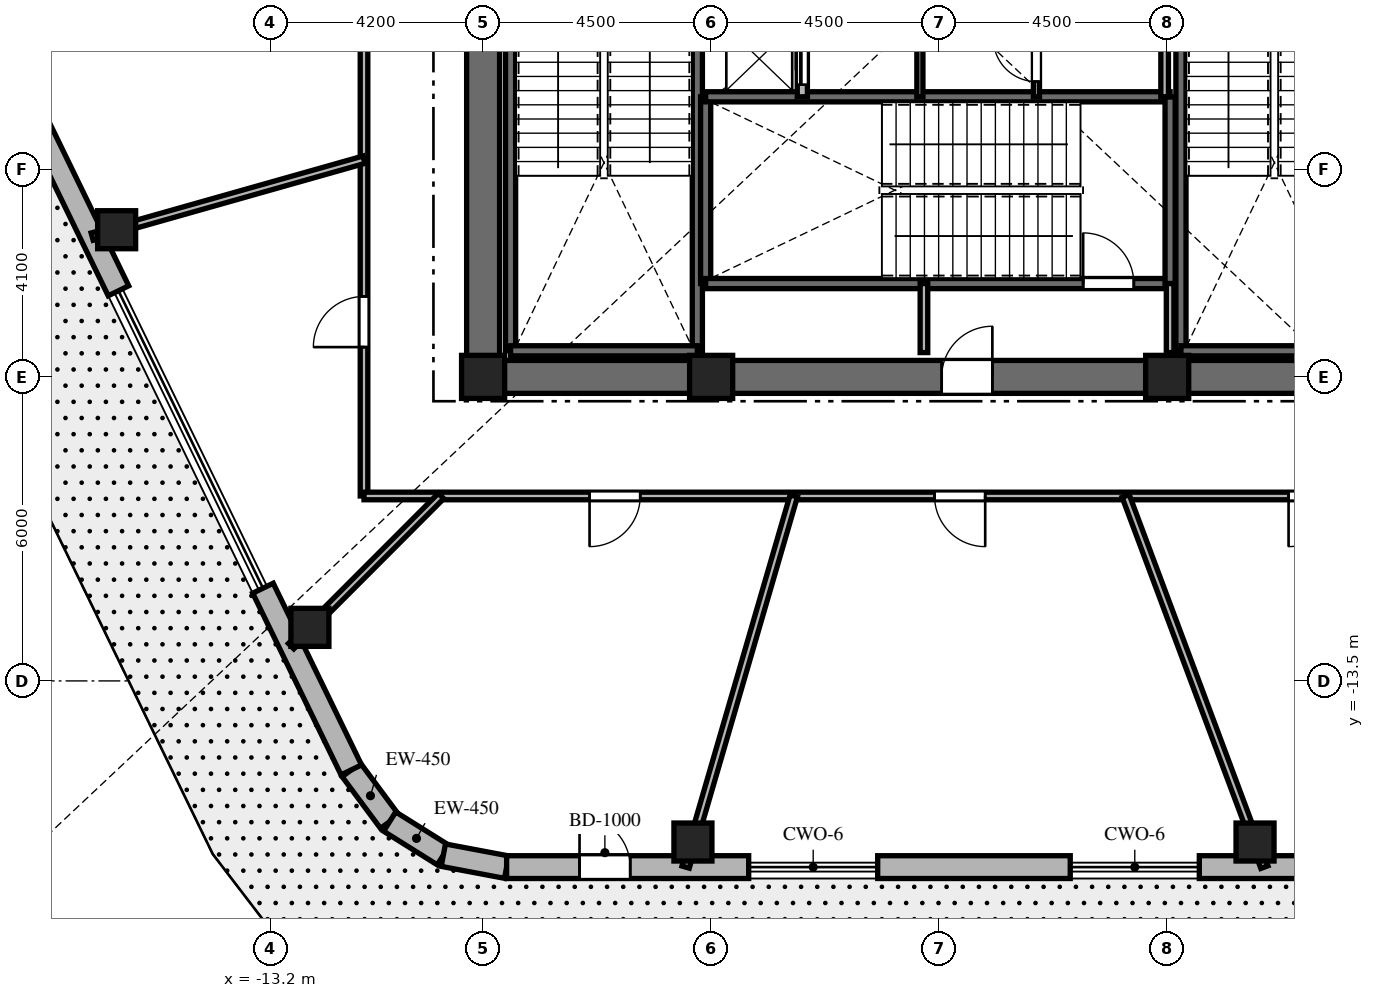
"""IFC4 building model, lengths in metres.
Left out: names, types, materials, properties, quantities, classifications, styles, units other than length and angle.
Written with IfcOpenShell. Run it as: python <this file> out.ifc"""

import sys

from ifc_helpers import new_model, si_unit, direction, frame, frame_2d, origin, origin_2d, place, context, subcontext, project, spatial, rectangle, extrude, element, fill, save


model = new_model("IFC4")
c1 = context("Model", 3, precision=1e-05, world=origin(), true_north=direction((0.0, 1.0)))
c2 = subcontext(c1, "Body", "Model", "MODEL_VIEW")
j1 = project(units=[si_unit("LENGTHUNIT", "METRE"), si_unit("PLANEANGLEUNIT", "RADIAN")], contexts=[c1])
p1 = place(None, origin())
s1 = spatial("IfcSite", under=j1, at=p1, CompositionType="ELEMENT")
p2 = place(p1, origin())
s2 = spatial("IfcBuilding", under=s1, at=p2, CompositionType="ELEMENT")
p3 = place(p2, frame((0.0, 0.0, 305.4)))
s3 = spatial("IfcBuildingStorey", under=s2, at=p3, CompositionType="ELEMENT", Elevation=305.4)
p4 = place(p3, frame((-9.325, -7.5, 0.0), z_axis=(0.0, 0.0, 1.0), x_axis=(1.0, 0.0, 0.0)))
e1 = element("IfcWall", 1, at=p4, inside=s3, PredefinedType="SHEAR", context=c2, shape_type="SweptSolid", body=[
    extrude(rectangle(XDim=18.65, YDim=0.65, at=frame_2d((9.325, 0.0))), origin(), (0.0, 0.0, 1.0), 5.0),
])
p5 = place(p4, frame((9.375, 0.0, 0.0)))
e2 = element("IfcOpeningElement", 2, at=p5, cuts=e1, PredefinedType="OPENING", context=c2, shape_type="SweptSolid", body=[
    extrude(rectangle(XDim=1.0, YDim=2.15, at=frame_2d((0.5, 1.075))), frame((0.0, 0.335, 0.0), z_axis=(0.0, -1.0, 0.0), x_axis=(1.0, 0.0, 0.0)), (0.0, 0.0, 1.0), 0.67),
])
p6 = place(p3, frame((-9.0, -7.175, 0.0), z_axis=(0.0, 0.0, 1.0), x_axis=(0.0, 1.0, 0.0)))
e3 = element("IfcWall", 3, at=p6, inside=s3, PredefinedType="SHEAR", context=c2, shape_type="SweptSolid", body=[
    extrude(rectangle(XDim=14.35, YDim=0.65, at=frame_2d((7.175, 0.0))), origin(), (0.0, 0.0, 1.0), 5.0),
])
p7 = place(p6, frame((10.3, 0.0, 0.0)))
e4 = element("IfcOpeningElement", 4, at=p7, cuts=e3, PredefinedType="OPENING", context=c2, shape_type="SweptSolid", body=[
    extrude(rectangle(XDim=1.05, YDim=2.15, at=frame_2d((0.525, 1.075))), frame((0.0, 0.335, 0.0), z_axis=(0.0, -1.0, 0.0), x_axis=(1.0, 0.0, 0.0)), (0.0, 0.0, 1.0), 0.67),
])
for number, where, z_axis, x_axis in (
    (5, (-8.458, -6.985, 0.0), (0.0, 0.0, 1.0), (0.0, 1.0, 0.0)),
    (6, (-4.772, -6.985, 0.0), (0.0, 0.0, 1.0), (0.0, 1.0, 0.0)),
):
    element("IfcWall", number, at=place(p3, frame(where, z_axis=z_axis, x_axis=x_axis)), inside=s3, PredefinedType="SHEAR", context=c2, shape_type="SweptSolid", body=[
        extrude(rectangle(XDim=9.143, YDim=0.2, at=frame_2d((4.572, 0.0))), origin(), (0.0, 0.0, 1.0), 5.0),
    ])
p8 = place(p3, frame((-8.458, -6.985, 0.0), z_axis=(0.0, 0.0, 1.0), x_axis=(1.0, 0.0, 0.0)))
e7 = element("IfcWall", 7, at=p8, inside=s3, PredefinedType="SHEAR", context=c2, shape_type="SweptSolid", body=[
    extrude(rectangle(XDim=3.686, YDim=0.2, at=frame_2d((1.843, 0.0))), origin(), (0.0, 0.0, 1.0), 5.0),
])
p9 = place(p3, frame((4.772, -6.985, 0.0), z_axis=(0.0, 0.0, 1.0), x_axis=(0.0, 1.0, 0.0)))
e8 = element("IfcWall", 8, at=p9, inside=s3, PredefinedType="SHEAR", context=c2, shape_type="SweptSolid", body=[
    extrude(rectangle(XDim=9.143, YDim=0.2, at=frame_2d((4.572, 0.0))), origin(), (0.0, 0.0, 1.0), 5.0),
])
for number, where, z_axis, x_axis in (
    (9, (4.772, -6.985, 0.0), (0.0, 0.0, 1.0), (1.0, 0.0, 0.0)),
    (10, (-4.608, -5.658, 0.0), (0.0, 0.0, 1.0), (0.0, 1.0, 0.0)),
):
    element("IfcWall", number, at=place(p3, frame(where, z_axis=z_axis, x_axis=x_axis)), inside=s3, PredefinedType="SHEAR", context=c2, shape_type="SweptSolid", body=[
        extrude(rectangle(XDim=3.686, YDim=0.2, at=frame_2d((1.843, 0.0))), origin(), (0.0, 0.0, 1.0), 5.0),
    ])
p10 = place(p3, frame((-4.608, -5.658, 0.0), z_axis=(0.0, 0.0, 1.0), x_axis=(1.0, 0.0, 0.0)))
e11 = element("IfcWall", 11, at=p10, inside=s3, PredefinedType="SHEAR", context=c2, shape_type="SweptSolid", body=[
    extrude(rectangle(XDim=9.166, YDim=0.2, at=frame_2d((4.583, 0.0))), origin(), (0.0, 0.0, 1.0), 5.0),
])
p11 = place(p10, frame((7.45, 0.0, 0.0)))
e12 = element("IfcOpeningElement", 12, at=p11, cuts=e11, PredefinedType="OPENING", context=c2, shape_type="SweptSolid", body=[
    extrude(rectangle(XDim=1.0, YDim=2.15, at=frame_2d((0.5, 1.075))), frame((0.0, 0.11, 0.0), z_axis=(0.0, -1.0, 0.0), x_axis=(1.0, 0.0, 0.0)), (0.0, 0.0, 1.0), 0.22),
])
p12 = place(p3, frame((-4.608, -1.972, 0.0), z_axis=(0.0, 0.0, 1.0), x_axis=(1.0, 0.0, 0.0)))
e13 = element("IfcWall", 13, at=p12, inside=s3, PredefinedType="SHEAR", context=c2, shape_type="SweptSolid", body=[
    extrude(rectangle(XDim=9.166, YDim=0.2, at=frame_2d((4.583, 0.0))), origin(), (0.0, 0.0, 1.0), 5.0),
])
p13 = place(p3, frame((4.558, -5.658, 0.0), z_axis=(0.0, 0.0, 1.0), x_axis=(0.0, 1.0, 0.0)))
e14 = element("IfcWall", 14, at=p13, inside=s3, PredefinedType="SHEAR", context=c2, shape_type="SweptSolid", body=[
    extrude(rectangle(XDim=3.686, YDim=0.2, at=frame_2d((1.843, 0.0))), origin(), (0.0, 0.0, 1.0), 5.0),
])
for number, where, z_axis, x_axis in (
    (15, (-9.0, -7.5, 0.0), (0.0, 0.0, 1.0), (1.0, 0.0, 0.0)),
    (16, (-4.5, -7.5, 0.0), (0.0, 0.0, 1.0), (1.0, 0.0, 0.0)),
    (17, (4.5, -7.5, 0.0), (0.0, 0.0, 1.0), (1.0, 0.0, 0.0)),
):
    element("IfcColumn", number, at=place(p3, frame(where, z_axis=z_axis, x_axis=x_axis)), inside=s3, PredefinedType="COLUMN", context=c2, shape_type="SweptSolid", body=[
        extrude(rectangle(XDim=0.85, YDim=0.85, at=origin_2d()), origin(), (0.0, 0.0, 1.0), 5.0),
    ])
for number, where, z_axis, x_axis in (
    (18, (-4.859, -16.68, 0.0), (0.0, 0.0, 1.0), (1.0, 0.0, 0.0)),
    (19, (6.234, -16.68, 0.0), (0.0, 0.0, 1.0), (1.0, 0.0, 0.0)),
    (20, (-16.232, -4.595, 0.0), (0.0, 0.0, 1.0), (1.0, 0.0, 0.0)),
    (21, (-12.418, -12.443, 0.0), (0.0, 0.0, 1.0), (1.0, 0.0, 0.0)),
):
    element("IfcColumn", number, at=place(p3, frame(where, z_axis=z_axis, x_axis=x_axis)), inside=s3, PredefinedType="COLUMN", context=c2, shape_type="SweptSolid", body=[
        extrude(rectangle(XDim=0.75, YDim=0.75, at=origin_2d()), origin(), (0.0, 0.0, 1.0), 5.0),
    ])
p14 = place(p3, frame((-11.602, -15.256, 0.0), z_axis=(0.0, 0.0, 1.0), x_axis=(0.596058719353, -0.802940846566, 0.0)))
e22 = element("IfcWall", 22, at=p14, inside=s3, PredefinedType="SOLIDWALL", context=c2, shape_type="SweptSolid", body=[
    extrude(rectangle(XDim=1.271, YDim=0.45, at=frame_2d((0.635, 0.0))), origin(), (0.0, 0.0, 1.0), 4.68),
])
p15 = place(p3, frame((-10.844, -16.277, 0.0), z_axis=(0.0, 0.0, 1.0), x_axis=(0.847723789959, -0.530437909597, 0.0)))
e23 = element("IfcWall", 23, at=p15, inside=s3, PredefinedType="SOLIDWALL", context=c2, shape_type="SweptSolid", body=[
    extrude(rectangle(XDim=1.25, YDim=0.45, at=frame_2d((0.625, 0.0))), origin(), (0.0, 0.0, 1.0), 4.68),
])
p16 = place(p3, frame((-9.785, -16.939, 0.0), z_axis=(0.0, 0.0, 1.0), x_axis=(0.982664955661, -0.185390358204, 0.0)))
e24 = element("IfcWall", 24, at=p16, inside=s3, PredefinedType="SOLIDWALL", context=c2, shape_type="SweptSolid", body=[
    extrude(rectangle(XDim=1.271, YDim=0.45, at=frame_2d((0.635, 0.0))), origin(), (0.0, 0.0, 1.0), 4.68),
])
p17 = place(p3, frame((-8.536, -17.175, 0.0), z_axis=(0.0, 0.0, 1.0), x_axis=(1.0, 0.0, 0.0)))
e25 = element("IfcWall", 25, at=p17, inside=s3, PredefinedType="SOLIDWALL", context=c2, shape_type="SweptSolid", body=[
    extrude(rectangle(XDim=4.777, YDim=0.45, at=frame_2d((2.389, 0.0))), origin(), (0.0, 0.0, 1.0), 4.68),
])
p18 = place(p17, frame((1.439, 0.0, 0.0)))
e26 = element("IfcOpeningElement", 26, at=p18, cuts=e25, PredefinedType="OPENING", context=c2, shape_type="SweptSolid", body=[
    extrude(rectangle(XDim=1.0, YDim=2.15, at=frame_2d((0.5, 1.075))), frame((0.0, 0.235, 0.0), z_axis=(0.0, -1.0, 0.0), x_axis=(1.0, 0.0, 0.0)), (0.0, 0.0, 1.0), 0.47),
])
p19 = place(p3, frame((-1.213, -17.175, 0.0), z_axis=(0.0, 0.0, 1.0), x_axis=(1.0, 0.0, 0.0)))
e27 = element("IfcWall", 27, at=p19, inside=s3, PredefinedType="SOLIDWALL", context=c2, shape_type="SweptSolid", body=[
    extrude(rectangle(XDim=3.8, YDim=0.45, at=frame_2d((1.9, 0.0))), origin(), (0.0, 0.0, 1.0), 4.68),
])
p20 = place(p3, frame((5.134, -17.175, 0.0), z_axis=(0.0, 0.0, 1.0), x_axis=(1.0, 0.0, 0.0)))
e28 = element("IfcWall", 28, at=p20, inside=s3, PredefinedType="SOLIDWALL", context=c2, shape_type="SweptSolid", body=[
    extrude(rectangle(XDim=4.773, YDim=0.45, at=frame_2d((2.387, 0.0))), origin(), (0.0, 0.0, 1.0), 4.68),
])
p21 = place(p3, frame((-17.942, -2.208, 0.0), z_axis=(0.0, 0.0, 1.0), x_axis=(0.437062225544, -0.899431270861, 0.0)))
e29 = element("IfcWall", 29, at=p21, inside=s3, PredefinedType="SOLIDWALL", context=c2, shape_type="SweptSolid", body=[
    extrude(rectangle(XDim=3.994, YDim=0.45, at=frame_2d((1.997, 0.0))), origin(), (0.0, 0.0, 1.0), 4.68),
])
p22 = place(p3, frame((-13.344, -11.67, 0.0), z_axis=(0.0, 0.0, 1.0), x_axis=(0.437044105444, -0.899440075768, 0.0)))
e30 = element("IfcWall", 30, at=p22, inside=s3, PredefinedType="SOLIDWALL", context=c2, shape_type="SweptSolid", body=[
    extrude(rectangle(XDim=3.987, YDim=0.45, at=frame_2d((1.993, 0.0))), origin(), (0.0, 0.0, 1.0), 4.68),
])
for number, where, z_axis, x_axis in (
    (31, (-0.3, -7.02, 0.0), (0.0, 0.0, 1.0), (0.0, 1.0, 0.0)),
    (32, (4.558, -7.02, 0.0), (0.0, 0.0, 1.0), (0.0, 1.0, 0.0)),
):
    element("IfcWall", number, at=place(p3, frame(where, z_axis=z_axis, x_axis=x_axis)), inside=s3, PredefinedType="PARTITIONING", context=c2, shape_type="SweptSolid", body=[
        extrude(rectangle(XDim=1.362, YDim=0.15, at=frame_2d((0.681, 0.0))), origin(), (0.0, 0.0, 1.0), 4.68),
    ])
p23 = place(p3, frame((-2.7, -1.972, 0.0), z_axis=(0.0, 0.0, 1.0), x_axis=(0.0, 1.0, 0.0)))
e33 = element("IfcWall", 33, at=p23, inside=s3, PredefinedType="PARTITIONING", context=c2, shape_type="SweptSolid", body=[
    extrude(rectangle(XDim=1.472, YDim=0.2, at=frame_2d((0.736, 0.0))), origin(), (0.0, 0.0, 1.0), 4.68),
])
p24 = place(p23, frame((0.24, 0.0, 0.0)))
e34 = element("IfcOpeningElement", 34, at=p24, cuts=e33, PredefinedType="OPENING", context=c2, shape_type="SweptSolid", body=[
    extrude(rectangle(XDim=1.0, YDim=2.2, at=frame_2d((0.5, 1.1))), frame((0.0, 0.11, 0.0), z_axis=(0.0, -1.0, 0.0), x_axis=(1.0, 0.0, 0.0)), (0.0, 0.0, 1.0), 0.22),
])
p25 = place(p3, frame((4.45, -1.972, 0.0), z_axis=(0.0, 0.0, 1.0), x_axis=(0.0, 1.0, 0.0)))
e35 = element("IfcWall", 35, at=p25, inside=s3, PredefinedType="PARTITIONING", context=c2, shape_type="SweptSolid", body=[
    extrude(rectangle(XDim=4.222, YDim=0.15, at=frame_2d((2.111, 0.0))), origin(), (0.0, 0.0, 1.0), 4.68),
])
p26 = place(p3, frame((-0.38, -1.972, 0.0), z_axis=(0.0, 0.0, 1.0), x_axis=(0.0, 1.0, 0.0)))
e36 = element("IfcWall", 36, at=p26, inside=s3, PredefinedType="PARTITIONING", context=c2, shape_type="SweptSolid", body=[
    extrude(rectangle(XDim=1.472, YDim=0.12, at=frame_2d((0.736, 0.0))), origin(), (0.0, 0.0, 1.0), 4.68),
])
p27 = place(p3, frame((1.92, -1.972, 0.0), z_axis=(0.0, 0.0, 1.0), x_axis=(0.0, 1.0, 0.0)))
e37 = element("IfcWall", 37, at=p27, inside=s3, PredefinedType="PARTITIONING", context=c2, shape_type="SweptSolid", body=[
    extrude(rectangle(XDim=1.472, YDim=0.12, at=frame_2d((0.736, 0.0))), origin(), (0.0, 0.0, 1.0), 4.68),
])
p28 = place(p27, frame((0.3, 0.0, 0.0)))
e38 = element("IfcOpeningElement", 38, at=p28, cuts=e37, PredefinedType="OPENING", context=c2, shape_type="SweptSolid", body=[
    extrude(rectangle(XDim=0.85, YDim=2.03, at=frame_2d((0.425, 1.015))), frame((0.0, 0.07, 0.0), z_axis=(0.0, -1.0, 0.0), x_axis=(1.0, 0.0, 0.0)), (0.0, 0.0, 1.0), 0.14),
])
p29 = place(p3, frame((-11.35, -9.85, 0.0), z_axis=(0.0, 0.0, 1.0), x_axis=(0.0, 1.0, 0.0)))
e39 = element("IfcWall", 39, at=p29, inside=s3, PredefinedType="PARTITIONING", context=c2, shape_type="SweptSolid", body=[
    extrude(rectangle(XDim=19.7, YDim=0.15, at=frame_2d((9.85, 0.0))), origin(), (0.0, 0.0, 1.0), 2.87),
])
p30 = place(p29, frame((15.219, 0.0, 0.0)))
e40 = element("IfcOpeningElement", 40, at=p30, cuts=e39, PredefinedType="OPENING", context=c2, shape_type="SweptSolid", body=[
    extrude(rectangle(XDim=1.0, YDim=2.03, at=frame_2d((0.5, 1.015))), frame((0.0, 0.085, 0.0), z_axis=(0.0, -1.0, 0.0), x_axis=(1.0, 0.0, 0.0)), (0.0, 0.0, 1.0), 0.17),
])
p31 = place(p29, frame((8.805, 0.0, 0.0)))
e41 = element("IfcOpeningElement", 41, at=p31, cuts=e39, PredefinedType="OPENING", context=c2, shape_type="SweptSolid", body=[
    extrude(rectangle(XDim=1.0, YDim=2.03, at=frame_2d((0.5, 1.015))), frame((0.0, 0.085, 0.0), z_axis=(0.0, -1.0, 0.0), x_axis=(1.0, 0.0, 0.0)), (0.0, 0.0, 1.0), 0.17),
])
p32 = place(p29, frame((2.938, 0.0, 0.0)))
e42 = element("IfcOpeningElement", 42, at=p32, cuts=e39, PredefinedType="OPENING", context=c2, shape_type="SweptSolid", body=[
    extrude(rectangle(XDim=1.0, YDim=2.03, at=frame_2d((0.5, 1.015))), frame((0.0, 0.085, 0.0), z_axis=(0.0, -1.0, 0.0), x_axis=(1.0, 0.0, 0.0)), (0.0, 0.0, 1.0), 0.17),
])
p33 = place(p3, frame((11.35, -9.85, 0.0), z_axis=(0.0, 0.0, 1.0), x_axis=(-1.0, 0.0, 0.0)))
e43 = element("IfcWall", 43, at=p33, inside=s3, PredefinedType="PARTITIONING", context=c2, shape_type="SweptSolid", body=[
    extrude(rectangle(XDim=22.7, YDim=0.15, at=frame_2d((11.35, 0.0))), origin(), (0.0, 0.0, 1.0), 2.87),
])
p34 = place(p33, frame((17.249, 0.0, 0.0)))
e44 = element("IfcOpeningElement", 44, at=p34, cuts=e43, PredefinedType="OPENING", context=c2, shape_type="SweptSolid", body=[
    extrude(rectangle(XDim=1.0, YDim=2.03, at=frame_2d((0.5, 1.015))), frame((0.0, 0.085, 0.0), z_axis=(0.0, -1.0, 0.0), x_axis=(1.0, 0.0, 0.0)), (0.0, 0.0, 1.0), 0.17),
])
p35 = place(p33, frame((10.441, 0.0, 0.0)))
e45 = element("IfcOpeningElement", 45, at=p35, cuts=e43, PredefinedType="OPENING", context=c2, shape_type="SweptSolid", body=[
    extrude(rectangle(XDim=1.0, YDim=2.03, at=frame_2d((0.5, 1.015))), frame((0.0, 0.085, 0.0), z_axis=(0.0, -1.0, 0.0), x_axis=(1.0, 0.0, 0.0)), (0.0, 0.0, 1.0), 0.17),
])
p36 = place(p33, frame((3.454, 0.0, 0.0)))
e46 = element("IfcOpeningElement", 46, at=p36, cuts=e43, PredefinedType="OPENING", context=c2, shape_type="SweptSolid", body=[
    extrude(rectangle(XDim=1.0, YDim=2.03, at=frame_2d((0.5, 1.015))), frame((0.0, 0.085, 0.0), z_axis=(0.0, -1.0, 0.0), x_axis=(1.0, 0.0, 0.0)), (0.0, 0.0, 1.0), 0.17),
])
p37 = place(p3, frame((-11.35, -3.213, 0.0), z_axis=(0.0, 0.0, 1.0), x_axis=(-0.962182015747, -0.272407357782, 0.0)))
e47 = element("IfcWall", 47, at=p37, inside=s3, PredefinedType="PARTITIONING", context=c2, shape_type="SweptSolid", body=[
    extrude(rectangle(XDim=5.576, YDim=0.15, at=frame_2d((2.788, 0.0))), origin(), (0.0, 0.0, 1.0), 2.87),
])
p38 = place(p3, frame((-9.83, -9.85, 0.0), z_axis=(0.0, 0.0, 1.0), x_axis=(-0.706435999186, -0.707776927467, 0.0)))
e48 = element("IfcWall", 48, at=p38, inside=s3, PredefinedType="PARTITIONING", context=c2, shape_type="SweptSolid", body=[
    extrude(rectangle(XDim=4.188, YDim=0.15, at=frame_2d((2.094, 0.0))), origin(), (0.0, 0.0, 1.0), 2.87),
])
p39 = place(p3, frame((-2.869, -9.85, 0.0), z_axis=(0.0, 0.0, 1.0), x_axis=(-0.279679268414, -0.960093488583, 0.0)))
e49 = element("IfcWall", 49, at=p39, inside=s3, PredefinedType="PARTITIONING", context=c2, shape_type="SweptSolid", body=[
    extrude(rectangle(XDim=7.629, YDim=0.15, at=frame_2d((3.815, 0.0))), origin(), (0.0, 0.0, 1.0), 2.87),
])
p40 = place(p3, frame((3.681, -9.85, 0.0), z_axis=(0.0, 0.0, 1.0), x_axis=(0.350079676448, -0.936719926199, 0.0)))
e50 = element("IfcWall", 50, at=p40, inside=s3, PredefinedType="PARTITIONING", context=c2, shape_type="SweptSolid", body=[
    extrude(rectangle(XDim=7.82, YDim=0.15, at=frame_2d((3.91, 0.0))), origin(), (0.0, 0.0, 1.0), 2.87),
])
p41 = place(p18, origin())
e51 = element("IfcDoor", 51, at=p41, inside=s3, OperationType="SINGLE_SWING_LEFT", PredefinedType="DOOR", context=c2, shape_type="SweptSolid", body=[
    extrude(rectangle(XDim=1.0, YDim=2.15, at=frame_2d((0.5, 1.075))), frame((0.0, 0.025, 0.0), z_axis=(0.0, -1.0, 0.0), x_axis=(1.0, 0.0, 0.0)), (0.0, 0.0, 1.0), 0.05),
])
fill(e26, e51)
p42 = place(p11, origin())
e52 = element("IfcDoor", 52, at=p42, inside=s3, OperationType="SINGLE_SWING_LEFT", PredefinedType="DOOR", context=c2, shape_type="SweptSolid", body=[
    extrude(rectangle(XDim=1.0, YDim=2.15, at=frame_2d((0.5, 1.075))), frame((0.0, 0.025, 0.0), z_axis=(0.0, -1.0, 0.0), x_axis=(1.0, 0.0, 0.0)), (0.0, 0.0, 1.0), 0.05),
])
fill(e12, e52)
p43 = place(p5, origin())
e53 = element("IfcDoor", 53, at=p43, inside=s3, OperationType="SINGLE_SWING_RIGHT", PredefinedType="DOOR", context=c2, shape_type="SweptSolid", body=[
    extrude(rectangle(XDim=1.0, YDim=2.15, at=frame_2d((0.5, 1.075))), frame((0.0, 0.025, 0.0), z_axis=(0.0, -1.0, 0.0), x_axis=(1.0, 0.0, 0.0)), (0.0, 0.0, 1.0), 0.05),
])
fill(e2, e53)
p44 = place(p24, origin())
e54 = element("IfcDoor", 54, at=p44, inside=s3, OperationType="SLIDING_TO_LEFT", PredefinedType="DOOR", context=c2, shape_type="SweptSolid", body=[
    extrude(rectangle(XDim=1.0, YDim=2.2, at=frame_2d((0.5, 1.1))), frame((0.0, 0.025, 0.0), z_axis=(0.0, -1.0, 0.0), x_axis=(1.0, 0.0, 0.0)), (0.0, 0.0, 1.0), 0.05),
])
fill(e34, e54)
p45 = place(p28, origin())
e55 = element("IfcDoor", 55, at=p45, inside=s3, OperationType="SINGLE_SWING_RIGHT", PredefinedType="DOOR", context=c2, shape_type="SweptSolid", body=[
    extrude(rectangle(XDim=0.85, YDim=2.03, at=frame_2d((0.425, 1.015))), frame((0.0, 0.025, 0.0), z_axis=(0.0, -1.0, 0.0), x_axis=(1.0, 0.0, 0.0)), (0.0, 0.0, 1.0), 0.05),
])
fill(e38, e55)
p46 = place(p32, origin())
e56 = element("IfcDoor", 56, at=p46, inside=s3, OperationType="SINGLE_SWING_LEFT", PredefinedType="DOOR", context=c2, shape_type="SweptSolid", body=[
    extrude(rectangle(XDim=1.0, YDim=2.03, at=frame_2d((0.5, 1.015))), frame((0.0, 0.025, 0.0), z_axis=(0.0, -1.0, 0.0), x_axis=(1.0, 0.0, 0.0)), (0.0, 0.0, 1.0), 0.05),
])
fill(e42, e56)
p47 = place(p34, origin())
e57 = element("IfcDoor", 57, at=p47, inside=s3, OperationType="SINGLE_SWING_RIGHT", PredefinedType="DOOR", context=c2, shape_type="SweptSolid", body=[
    extrude(rectangle(XDim=1.0, YDim=2.03, at=frame_2d((0.5, 1.015))), frame((0.0, 0.025, 0.0), z_axis=(0.0, -1.0, 0.0), x_axis=(1.0, 0.0, 0.0)), (0.0, 0.0, 1.0), 0.05),
])
fill(e44, e57)
p48 = place(p35, origin())
e58 = element("IfcDoor", 58, at=p48, inside=s3, OperationType="SINGLE_SWING_LEFT", PredefinedType="DOOR", context=c2, shape_type="SweptSolid", body=[
    extrude(rectangle(XDim=1.0, YDim=2.03, at=frame_2d((0.5, 1.015))), frame((0.0, 0.025, 0.0), z_axis=(0.0, -1.0, 0.0), x_axis=(1.0, 0.0, 0.0)), (0.0, 0.0, 1.0), 0.05),
])
fill(e45, e58)
p49 = place(p36, origin())
e59 = element("IfcDoor", 59, at=p49, inside=s3, OperationType="SINGLE_SWING_RIGHT", PredefinedType="DOOR", context=c2, shape_type="SweptSolid", body=[
    extrude(rectangle(XDim=1.0, YDim=2.03, at=frame_2d((0.5, 1.015))), frame((0.0, 0.025, 0.0), z_axis=(0.0, -1.0, 0.0), x_axis=(1.0, 0.0, 0.0)), (0.0, 0.0, 1.0), 0.05),
])
fill(e46, e59)
save(model, sys.argv[1])
